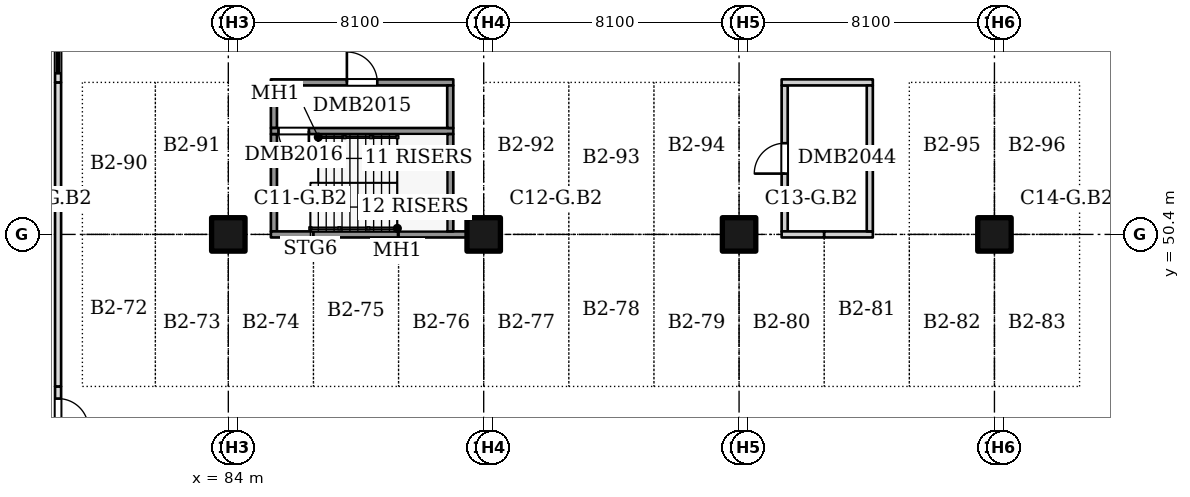
"""IFC4 building model, lengths in metres.
Left out: names, types, materials, properties, quantities, classifications, styles, units other than length and angle.
Written with IfcOpenShell. Run it as: python <this file> out.ifc"""

import sys

from ifc_helpers import new_model, si_unit, direction, frame, frame_2d, origin, origin_2d, place, context, subcontext, project, spatial, rectangle, extrude, element, fill, save


model = new_model("IFC4")
c1 = context("Model", 3, precision=1e-05, world=origin(), true_north=direction((0.0, 1.0)))
c2 = subcontext(c1, "Body", "Model", "MODEL_VIEW")
j1 = project(units=[si_unit("LENGTHUNIT", "METRE"), si_unit("PLANEANGLEUNIT", "RADIAN")], contexts=[c1])
p1 = place(None, origin())
s1 = spatial("IfcSite", under=j1, at=p1, CompositionType="ELEMENT")
p2 = place(p1, origin())
s2 = spatial("IfcBuilding", under=s1, at=p2, CompositionType="ELEMENT")
p3 = place(p2, frame((0.0, 0.0, -8.0)))
s3 = spatial("IfcBuildingStorey", under=s2, at=p3, CompositionType="ELEMENT", Elevation=-8.0)
for number, where, z_axis, x_axis in (
    (1, (84.0, 50.4, 0.0), (0.0, 0.0, 1.0), (1.0, 0.0, 0.0)),
    (2, (92.4, 50.4, 0.0), (0.0, 0.0, 1.0), (1.0, 0.0, 0.0)),
    (3, (100.8, 50.4, 0.0), (0.0, 0.0, 1.0), (1.0, 0.0, 0.0)),
    (4, (109.2, 50.4, 0.0), (0.0, 0.0, 1.0), (1.0, 0.0, 0.0)),
):
    element("IfcColumn", number, at=place(p3, frame(where, z_axis=z_axis, x_axis=x_axis)), inside=s3, PredefinedType="COLUMN", context=c2, shape_type="SweptSolid", body=[
        extrude(rectangle(XDim=1.1, YDim=1.1, at=origin_2d()), origin(), (0.0, 0.0, 1.0), 3.7),
    ])
p4 = place(p3, frame((85.5, 50.5, 0.0), z_axis=(0.0, 0.0, 1.0), x_axis=(0.0, 1.0, 0.0)))
e5 = element("IfcWall", 5, at=p4, inside=s3, PredefinedType="SOLIDWALL", context=c2, shape_type="SweptSolid", body=[
    extrude(rectangle(XDim=3.2, YDim=0.2, at=frame_2d((1.6, 0.0))), origin(), (0.0, 0.0, 1.0), 3.7),
])
for number, where, z_axis, x_axis in (
    (6, (85.4, 50.4, 0.0), (0.0, 0.0, 1.0), (1.0, 0.0, 0.0)),
    (7, (85.5, 53.9, 0.0), (0.0, 0.0, 1.0), (0.0, 1.0, 0.0)),
):
    element("IfcWall", number, at=place(p3, frame(where, z_axis=z_axis, x_axis=x_axis)), inside=s3, PredefinedType="SOLIDWALL", context=c2, shape_type="SweptSolid", body=[
        extrude(rectangle(XDim=1.4, YDim=0.2, at=frame_2d((0.7, 0.0))), origin(), (0.0, 0.0, 1.0), 3.7),
    ])
p5 = place(p3, frame((85.4, 53.8, 0.0), z_axis=(0.0, 0.0, 1.0), x_axis=(1.0, 0.0, 0.0)))
e8 = element("IfcWall", 8, at=p5, inside=s3, PredefinedType="SOLIDWALL", context=c2, shape_type="SweptSolid", body=[
    extrude(rectangle(XDim=6.0, YDim=0.2, at=frame_2d((3.0, 0.0))), origin(), (0.0, 0.0, 1.0), 3.7),
])
p6 = place(p5, frame((0.25, 0.0, 0.0)))
e9 = element("IfcOpeningElement", 9, at=p6, cuts=e8, PredefinedType="OPENING", context=c2, shape_type="SweptSolid", body=[
    extrude(rectangle(XDim=1.0, YDim=2.1, at=frame_2d((0.5, 1.05))), frame((0.0, 0.11, 0.0), z_axis=(0.0, -1.0, 0.0), x_axis=(1.0, 0.0, 0.0)), (0.0, 0.0, 1.0), 0.22),
])
p7 = place(p3, frame((85.4, 55.4, 0.0), z_axis=(0.0, 0.0, 1.0), x_axis=(1.0, 0.0, 0.0)))
e10 = element("IfcWall", 10, at=p7, inside=s3, PredefinedType="SOLIDWALL", context=c2, shape_type="SweptSolid", body=[
    extrude(rectangle(XDim=6.0, YDim=0.2, at=frame_2d((3.0, 0.0))), origin(), (0.0, 0.0, 1.0), 3.7),
])
p8 = place(p7, frame((2.5, 0.0, 0.0)))
e11 = element("IfcOpeningElement", 11, at=p8, cuts=e10, PredefinedType="OPENING", context=c2, shape_type="SweptSolid", body=[
    extrude(rectangle(XDim=1.0, YDim=2.1, at=frame_2d((0.5, 1.05))), frame((0.0, 0.11, 0.0), z_axis=(0.0, -1.0, 0.0), x_axis=(1.0, 0.0, 0.0)), (0.0, 0.0, 1.0), 0.22),
])
p9 = place(p3, frame((86.8, 50.4, 0.0), z_axis=(0.0, 0.0, 1.0), x_axis=(1.0, 0.0, 0.0)))
e12 = element("IfcWall", 12, at=p9, inside=s3, PredefinedType="SOLIDWALL", context=c2, shape_type="SweptSolid", body=[
    extrude(rectangle(XDim=2.8, YDim=0.2, at=frame_2d((1.4, 0.0))), origin(), (0.0, 0.0, 1.0), 3.7),
])
p10 = place(p3, frame((89.6, 50.4, 0.0), z_axis=(0.0, 0.0, 1.0), x_axis=(1.0, 0.0, 0.0)))
e13 = element("IfcWall", 13, at=p10, inside=s3, PredefinedType="SOLIDWALL", context=c2, shape_type="SweptSolid", body=[
    extrude(rectangle(XDim=2.25, YDim=0.2, at=frame_2d((1.125, 0.0))), origin(), (0.0, 0.0, 1.0), 3.7),
])
p11 = place(p3, frame((91.3, 50.5, 0.0), z_axis=(0.0, 0.0, 1.0), x_axis=(0.0, 1.0, 0.0)))
e14 = element("IfcWall", 14, at=p11, inside=s3, PredefinedType="SOLIDWALL", context=c2, shape_type="SweptSolid", body=[
    extrude(rectangle(XDim=3.2, YDim=0.2, at=frame_2d((1.6, 0.0))), origin(), (0.0, 0.0, 1.0), 3.7),
])
p12 = place(p3, frame((91.3, 53.9, 0.0), z_axis=(0.0, 0.0, 1.0), x_axis=(0.0, 1.0, 0.0)))
e15 = element("IfcWall", 15, at=p12, inside=s3, PredefinedType="SOLIDWALL", context=c2, shape_type="SweptSolid", body=[
    extrude(rectangle(XDim=1.4, YDim=0.2, at=frame_2d((0.7, 0.0))), origin(), (0.0, 0.0, 1.0), 3.7),
])
p13 = place(p3, frame((102.3, 50.5, 0.0), z_axis=(0.0, 0.0, 1.0), x_axis=(0.0, 1.0, 0.0)))
e16 = element("IfcWall", 16, at=p13, inside=s3, PredefinedType="PARTITIONING", context=c2, shape_type="SweptSolid", body=[
    extrude(rectangle(XDim=4.8, YDim=0.2, at=frame_2d((2.4, 0.0))), origin(), (0.0, 0.0, 1.0), 3.7),
])
p14 = place(p13, frame((1.9, 0.0, 0.0)))
e17 = element("IfcOpeningElement", 17, at=p14, cuts=e16, PredefinedType="OPENING", context=c2, shape_type="SweptSolid", body=[
    extrude(rectangle(XDim=1.0, YDim=2.1, at=frame_2d((0.5, 1.05))), frame((0.0, 0.11, 0.0), z_axis=(0.0, -1.0, 0.0), x_axis=(1.0, 0.0, 0.0)), (0.0, 0.0, 1.0), 0.22),
])
p15 = place(p3, frame((102.2, 50.4, 0.0), z_axis=(0.0, 0.0, 1.0), x_axis=(1.0, 0.0, 0.0)))
e18 = element("IfcWall", 18, at=p15, inside=s3, PredefinedType="PARTITIONING", context=c2, shape_type="SweptSolid", body=[
    extrude(rectangle(XDim=1.4, YDim=0.2, at=frame_2d((0.7, 0.0))), origin(), (0.0, 0.0, 1.0), 3.7),
])
p16 = place(p3, frame((102.2, 55.4, 0.0), z_axis=(0.0, 0.0, 1.0), x_axis=(1.0, 0.0, 0.0)))
e19 = element("IfcWall", 19, at=p16, inside=s3, PredefinedType="PARTITIONING", context=c2, shape_type="SweptSolid", body=[
    extrude(rectangle(XDim=3.0, YDim=0.2, at=frame_2d((1.5, 0.0))), origin(), (0.0, 0.0, 1.0), 3.7),
])
p17 = place(p3, frame((103.6, 50.4, 0.0), z_axis=(0.0, 0.0, 1.0), x_axis=(1.0, 0.0, 0.0)))
e20 = element("IfcWall", 20, at=p17, inside=s3, PredefinedType="PARTITIONING", context=c2, shape_type="SweptSolid", body=[
    extrude(rectangle(XDim=1.6, YDim=0.2, at=frame_2d((0.8, 0.0))), origin(), (0.0, 0.0, 1.0), 3.7),
])
p18 = place(p3, frame((105.1, 50.5, 0.0), z_axis=(0.0, 0.0, 1.0), x_axis=(0.0, 1.0, 0.0)))
e21 = element("IfcWall", 21, at=p18, inside=s3, PredefinedType="PARTITIONING", context=c2, shape_type="SweptSolid", body=[
    extrude(rectangle(XDim=4.8, YDim=0.2, at=frame_2d((2.4, 0.0))), origin(), (0.0, 0.0, 1.0), 3.7),
])
p19 = place(p3, frame((78.4, 38.6, 0.0), z_axis=(0.0, 0.0, 1.0), x_axis=(0.0, 1.0, 0.0)))
e22 = element("IfcWall", 22, at=p19, inside=s3, PredefinedType="PARTITIONING", context=c2, shape_type="SweptSolid", body=[
    extrude(rectangle(XDim=6.8, YDim=0.2, at=frame_2d((3.4, 0.0))), origin(), (0.0, 0.0, 1.0), 3.7),
])
p20 = place(p19, frame((0.3, 0.0, 0.0)))
e23 = element("IfcOpeningElement", 23, at=p20, cuts=e22, PredefinedType="OPENING", context=c2, shape_type="SweptSolid", body=[
    extrude(rectangle(XDim=4.8, YDim=2.4, at=frame_2d((2.4, 1.2))), frame((0.0, 0.11, 0.0), z_axis=(0.0, -1.0, 0.0), x_axis=(1.0, 0.0, 0.0)), (0.0, 0.0, 1.0), 0.22),
])
p21 = place(p19, frame((5.4, 0.0, 0.0)))
e24 = element("IfcOpeningElement", 24, at=p21, cuts=e22, PredefinedType="OPENING", context=c2, shape_type="SweptSolid", body=[
    extrude(rectangle(XDim=1.0, YDim=2.1, at=frame_2d((0.5, 1.05))), frame((0.0, 0.11, 0.0), z_axis=(0.0, -1.0, 0.0), x_axis=(1.0, 0.0, 0.0)), (0.0, 0.0, 1.0), 0.22),
])
p22 = place(p3, frame((78.4, 45.4, 0.0), z_axis=(0.0, 0.0, 1.0), x_axis=(0.0, 1.0, 0.0)))
e25 = element("IfcWall", 25, at=p22, inside=s3, PredefinedType="PARTITIONING", context=c2, shape_type="SweptSolid", body=[
    extrude(rectangle(XDim=10.0, YDim=0.2, at=frame_2d((5.0, 0.0))), origin(), (0.0, 0.0, 1.0), 3.7),
])
p23 = place(p3, frame((78.4, 55.4, 0.0), z_axis=(0.0, 0.0, 1.0), x_axis=(0.0, 1.0, 0.0)))
e26 = element("IfcWall", 26, at=p23, inside=s3, PredefinedType="PARTITIONING", context=c2, shape_type="SweptSolid", body=[
    extrude(rectangle(XDim=6.8, YDim=0.2, at=frame_2d((3.4, 0.0))), origin(), (0.0, 0.0, 1.0), 3.7),
])
p24 = place(p23, frame((0.3, 0.0, 0.0)))
e27 = element("IfcOpeningElement", 27, at=p24, cuts=e26, PredefinedType="OPENING", context=c2, shape_type="SweptSolid", body=[
    extrude(rectangle(XDim=4.8, YDim=2.4, at=frame_2d((2.4, 1.2))), frame((0.0, 0.11, 0.0), z_axis=(0.0, -1.0, 0.0), x_axis=(1.0, 0.0, 0.0)), (0.0, 0.0, 1.0), 0.22),
])
p25 = place(p23, frame((5.4, 0.0, 0.0)))
e28 = element("IfcOpeningElement", 28, at=p25, cuts=e26, PredefinedType="OPENING", context=c2, shape_type="SweptSolid", body=[
    extrude(rectangle(XDim=1.0, YDim=2.1, at=frame_2d((0.5, 1.05))), frame((0.0, 0.11, 0.0), z_axis=(0.0, -1.0, 0.0), x_axis=(1.0, 0.0, 0.0)), (0.0, 0.0, 1.0), 0.22),
])
p26 = place(p8, origin())
e29 = element("IfcDoor", 29, at=p26, inside=s3, OperationType="SINGLE_SWING_LEFT", PredefinedType="DOOR", context=c2, shape_type="SweptSolid", body=[
    extrude(rectangle(XDim=1.0, YDim=2.1, at=frame_2d((0.5, 1.05))), frame((0.0, 0.025, 0.0), z_axis=(0.0, -1.0, 0.0), x_axis=(1.0, 0.0, 0.0)), (0.0, 0.0, 1.0), 0.05),
])
fill(e11, e29)
p27 = place(p6, frame((1.0, 0.0, 0.0), z_axis=(0.0, 0.0, 1.0), x_axis=(-1.0, 0.0, 0.0)))
e30 = element("IfcDoor", 30, at=p27, inside=s3, OperationType="SINGLE_SWING_LEFT", PredefinedType="DOOR", context=c2, shape_type="SweptSolid", body=[
    extrude(rectangle(XDim=1.0, YDim=2.1, at=frame_2d((0.5, 1.05))), frame((0.0, 0.025, 0.0), z_axis=(0.0, -1.0, 0.0), x_axis=(1.0, 0.0, 0.0)), (0.0, 0.0, 1.0), 0.05),
])
fill(e9, e30)
p28 = place(p14, origin())
e31 = element("IfcDoor", 31, at=p28, inside=s3, OperationType="SINGLE_SWING_LEFT", PredefinedType="DOOR", context=c2, shape_type="SweptSolid", body=[
    extrude(rectangle(XDim=1.0, YDim=2.1, at=frame_2d((0.5, 1.05))), frame((0.0, 0.025, 0.0), z_axis=(0.0, -1.0, 0.0), x_axis=(1.0, 0.0, 0.0)), (0.0, 0.0, 1.0), 0.05),
])
fill(e17, e31)
p29 = place(p21, frame((1.0, 0.0, 0.0), z_axis=(0.0, 0.0, 1.0), x_axis=(-1.0, 0.0, 0.0)))
e32 = element("IfcDoor", 32, at=p29, inside=s3, OperationType="SINGLE_SWING_RIGHT", PredefinedType="DOOR", context=c2, shape_type="SweptSolid", body=[
    extrude(rectangle(XDim=1.0, YDim=2.1, at=frame_2d((0.5, 1.05))), frame((0.0, 0.025, 0.0), z_axis=(0.0, -1.0, 0.0), x_axis=(1.0, 0.0, 0.0)), (0.0, 0.0, 1.0), 0.05),
])
fill(e24, e32)
p30 = place(p24, origin())
e33 = element("IfcDoor", 33, at=p30, inside=s3, OperationType="ROLLINGUP", PredefinedType="GATE", context=c2, shape_type="SweptSolid", body=[
    extrude(rectangle(XDim=4.8, YDim=2.4, at=frame_2d((2.4, 1.2))), frame((0.0, 0.025, 0.0), z_axis=(0.0, -1.0, 0.0), x_axis=(1.0, 0.0, 0.0)), (0.0, 0.0, 1.0), 0.05),
])
fill(e27, e33)
save(model, sys.argv[1])
